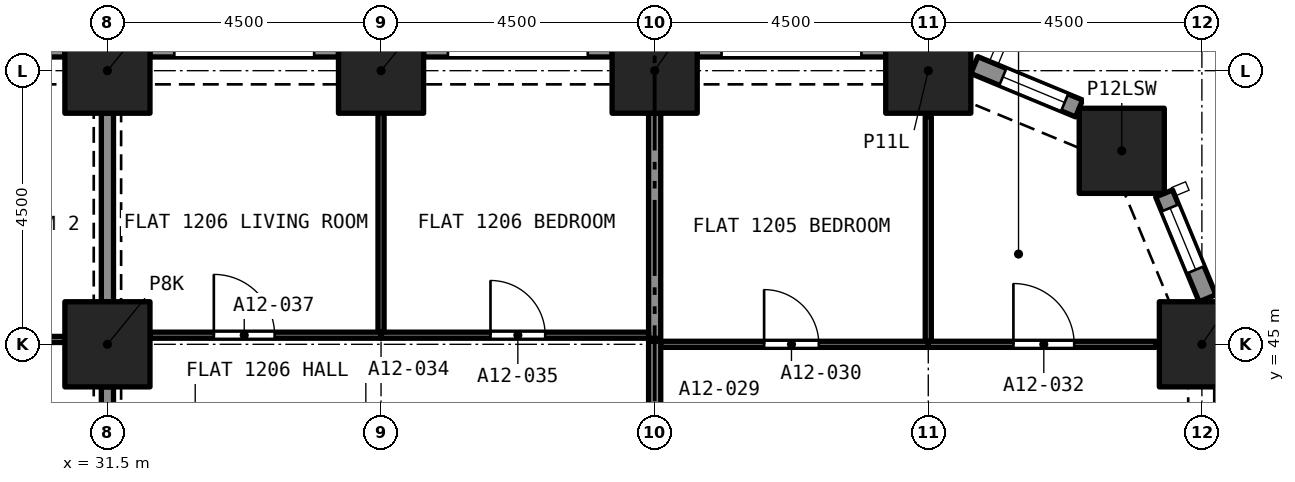
"""IFC4 building model, lengths in metres.
Left out: names, types, materials, properties, quantities, classifications, styles, units other than length and angle.
Written with IfcOpenShell. Run it as: python <this file> out.ifc"""

import sys

from ifc_helpers import new_model, si_unit, direction, frame, frame_2d, origin, origin_2d, place, context, subcontext, project, spatial, rectangle, extrude, element, fill, save


model = new_model("IFC4")
c1 = context("Model", 3, precision=1e-05, world=origin(), true_north=direction((0.0, 1.0)))
c2 = subcontext(c1, "Body", "Model", "MODEL_VIEW")
j1 = project(units=[si_unit("LENGTHUNIT", "METRE"), si_unit("PLANEANGLEUNIT", "RADIAN")], contexts=[c1])
p1 = place(None, origin())
s1 = spatial("IfcSite", under=j1, at=p1, CompositionType="ELEMENT")
p2 = place(p1, origin())
s2 = spatial("IfcBuilding", under=s1, at=p2, CompositionType="ELEMENT")
p3 = place(p2, frame((0.0, 0.0, 49.6)))
s3 = spatial("IfcBuildingStorey", under=s2, at=p3, CompositionType="ELEMENT", Elevation=49.6)
for number, where, z_axis, x_axis in (
    (1, (31.5, 45.0, 0.0), (0.0, 0.0, 1.0), (1.0, 0.0, 0.0)),
    (2, (49.5, 45.0, 0.0), (0.0, 0.0, 1.0), (1.0, 0.0, 0.0)),
    (3, (48.182, 48.182, 0.0), (0.0, 0.0, 1.0), (1.0, 0.0, 0.0)),
    (4, (31.5, 49.5, 0.0), (0.0, 0.0, 1.0), (1.0, 0.0, 0.0)),
    (5, (36.0, 49.5, 0.0), (0.0, 0.0, 1.0), (1.0, 0.0, 0.0)),
    (6, (40.5, 49.5, 0.0), (0.0, 0.0, 1.0), (1.0, 0.0, 0.0)),
    (7, (45.0, 49.5, 0.0), (0.0, 0.0, 1.0), (1.0, 0.0, 0.0)),
):
    element("IfcColumn", number, at=place(p3, frame(where, z_axis=z_axis, x_axis=x_axis)), inside=s3, PredefinedType="COLUMN", context=c2, shape_type="SweptSolid", body=[
        extrude(rectangle(XDim=1.4, YDim=1.4, at=origin_2d()), origin(), (0.0, 0.0, 1.0), 3.2),
    ])
p4 = place(p3, frame((48.878, 47.48, 0.0), z_axis=(0.0, 0.0, 1.0), x_axis=(0.38262540684, -0.923903565336, 0.0)))
e8 = element("IfcWall", 8, at=p4, inside=s3, PredefinedType="SOLIDWALL", context=c2, shape_type="SweptSolid", body=[
    extrude(rectangle(XDim=1.865, YDim=0.3, at=frame_2d((0.933, 0.0))), origin(), (0.0, 0.0, 1.0), 3.2),
])
p5 = place(p4, frame((0.258, 0.0, 0.45)))
e9 = element("IfcOpeningElement", 9, at=p5, cuts=e8, PredefinedType="OPENING", context=c2, shape_type="SweptSolid", body=[
    extrude(rectangle(XDim=1.1, YDim=1.95, at=frame_2d((0.55, 0.975))), frame((0.0, 0.16, 0.0), z_axis=(0.0, -1.0, 0.0), x_axis=(1.0, 0.0, 0.0)), (0.0, 0.0, 1.0), 0.32),
])
p6 = place(p3, frame((45.757, 49.592, 0.0), z_axis=(0.0, 0.0, 1.0), x_axis=(0.923857286003, -0.382737135771, 0.0)))
e10 = element("IfcWall", 10, at=p6, inside=s3, PredefinedType="SOLIDWALL", context=c2, shape_type="SweptSolid", body=[
    extrude(rectangle(XDim=1.865, YDim=0.3, at=frame_2d((0.933, 0.0))), origin(), (0.0, 0.0, 1.0), 3.2),
])
p7 = place(p6, frame((0.508, 0.0, 0.45)))
e11 = element("IfcOpeningElement", 11, at=p7, cuts=e10, PredefinedType="OPENING", context=c2, shape_type="SweptSolid", body=[
    extrude(rectangle(XDim=1.1, YDim=1.95, at=frame_2d((0.55, 0.975))), frame((0.0, 0.16, 0.0), z_axis=(0.0, -1.0, 0.0), x_axis=(1.0, 0.0, 0.0)), (0.0, 0.0, 1.0), 0.32),
])
p8 = place(p3, frame((41.2, 49.875, 0.0), z_axis=(0.0, 0.0, 1.0), x_axis=(1.0, 0.0, 0.0)))
e12 = element("IfcWall", 12, at=p8, inside=s3, PredefinedType="SOLIDWALL", context=c2, shape_type="SweptSolid", body=[
    extrude(rectangle(XDim=3.1, YDim=0.3, at=frame_2d((1.55, 0.0))), origin(), (0.0, 0.0, 1.0), 3.2),
])
p9 = place(p8, frame((0.4, 0.0, 0.45)))
e13 = element("IfcOpeningElement", 13, at=p9, cuts=e12, PredefinedType="OPENING", context=c2, shape_type="SweptSolid", body=[
    extrude(rectangle(XDim=2.3, YDim=1.95, at=frame_2d((1.15, 0.975))), frame((0.0, 0.16, 0.0), z_axis=(0.0, -1.0, 0.0), x_axis=(1.0, 0.0, 0.0)), (0.0, 0.0, 1.0), 0.32),
])
p10 = place(p3, frame((36.7, 49.875, 0.0), z_axis=(0.0, 0.0, 1.0), x_axis=(1.0, 0.0, 0.0)))
e14 = element("IfcWall", 14, at=p10, inside=s3, PredefinedType="SOLIDWALL", context=c2, shape_type="SweptSolid", body=[
    extrude(rectangle(XDim=3.1, YDim=0.3, at=frame_2d((1.55, 0.0))), origin(), (0.0, 0.0, 1.0), 3.2),
])
p11 = place(p10, frame((0.4, 0.0, 0.45)))
e15 = element("IfcOpeningElement", 15, at=p11, cuts=e14, PredefinedType="OPENING", context=c2, shape_type="SweptSolid", body=[
    extrude(rectangle(XDim=2.3, YDim=1.95, at=frame_2d((1.15, 0.975))), frame((0.0, 0.16, 0.0), z_axis=(0.0, -1.0, 0.0), x_axis=(1.0, 0.0, 0.0)), (0.0, 0.0, 1.0), 0.32),
])
p12 = place(p3, frame((32.2, 49.875, 0.0), z_axis=(0.0, 0.0, 1.0), x_axis=(1.0, 0.0, 0.0)))
e16 = element("IfcWall", 16, at=p12, inside=s3, PredefinedType="SOLIDWALL", context=c2, shape_type="SweptSolid", body=[
    extrude(rectangle(XDim=3.1, YDim=0.3, at=frame_2d((1.55, 0.0))), origin(), (0.0, 0.0, 1.0), 3.2),
])
p13 = place(p12, frame((0.4, 0.0, 0.45)))
e17 = element("IfcOpeningElement", 17, at=p13, cuts=e16, PredefinedType="OPENING", context=c2, shape_type="SweptSolid", body=[
    extrude(rectangle(XDim=2.3, YDim=1.95, at=frame_2d((1.15, 0.975))), frame((0.0, 0.16, 0.0), z_axis=(0.0, -1.0, 0.0), x_axis=(1.0, 0.0, 0.0)), (0.0, 0.0, 1.0), 0.32),
])
p14 = place(p3, frame((27.7, 49.875, 0.0), z_axis=(0.0, 0.0, 1.0), x_axis=(1.0, 0.0, 0.0)))
e18 = element("IfcWall", 18, at=p14, inside=s3, PredefinedType="SOLIDWALL", context=c2, shape_type="SweptSolid", body=[
    extrude(rectangle(XDim=3.1, YDim=0.3, at=frame_2d((1.55, 0.0))), origin(), (0.0, 0.0, 1.0), 3.2),
])
p15 = place(p14, frame((0.4, 0.0, 0.45)))
e19 = element("IfcOpeningElement", 19, at=p15, cuts=e18, PredefinedType="OPENING", context=c2, shape_type="SweptSolid", body=[
    extrude(rectangle(XDim=2.3, YDim=1.95, at=frame_2d((1.15, 0.975))), frame((0.0, 0.16, 0.0), z_axis=(0.0, -1.0, 0.0), x_axis=(1.0, 0.0, 0.0)), (0.0, 0.0, 1.0), 0.32),
])
p16 = place(p3, frame((40.6, 45.0, 0.0), z_axis=(0.0, 0.0, 1.0), x_axis=(1.0, 0.0, 0.0)))
e20 = element("IfcWall", 20, at=p16, inside=s3, PredefinedType="PARTITIONING", context=c2, shape_type="SweptSolid", body=[
    extrude(rectangle(XDim=4.4, YDim=0.1, at=frame_2d((2.2, 0.0))), origin(), (0.0, 0.0, 1.0), 2.9),
])
p17 = place(p16, frame((1.7, 0.0, 0.0)))
e21 = element("IfcOpeningElement", 21, at=p17, cuts=e20, PredefinedType="OPENING", context=c2, shape_type="SweptSolid", body=[
    extrude(rectangle(XDim=0.9, YDim=2.1, at=frame_2d((0.45, 1.05))), frame((0.0, 0.06, 0.0), z_axis=(0.0, -1.0, 0.0), x_axis=(1.0, 0.0, 0.0)), (0.0, 0.0, 1.0), 0.12),
])
p18 = place(p3, frame((45.0, 45.05, 0.0), z_axis=(0.0, 0.0, 1.0), x_axis=(0.0, 1.0, 0.0)))
e22 = element("IfcWall", 22, at=p18, inside=s3, PredefinedType="PARTITIONING", context=c2, shape_type="SweptSolid", body=[
    extrude(rectangle(XDim=3.692, YDim=0.1, at=frame_2d((1.846, 0.0))), origin(), (0.0, 0.0, 1.0), 2.9),
])
p19 = place(p3, frame((40.5, 45.1, 0.0), z_axis=(0.0, 0.0, 1.0), x_axis=(0.0, 1.0, 0.0)))
e23 = element("IfcWall", 23, at=p19, inside=s3, PredefinedType="PARTITIONING", context=c2, shape_type="SweptSolid", body=[
    extrude(rectangle(XDim=3.7, YDim=0.2, at=frame_2d((1.85, 0.0))), origin(), (0.0, 0.0, 1.0), 2.9),
])
p20 = place(p3, frame((45.0, 45.0, 0.0), z_axis=(0.0, 0.0, 1.0), x_axis=(1.0, 0.0, 0.0)))
e24 = element("IfcWall", 24, at=p20, inside=s3, PredefinedType="PARTITIONING", context=c2, shape_type="SweptSolid", body=[
    extrude(rectangle(XDim=3.742, YDim=0.1, at=frame_2d((1.871, 0.0))), origin(), (0.0, 0.0, 1.0), 2.9),
])
p21 = place(p20, frame((1.4, 0.0, 0.0)))
e25 = element("IfcOpeningElement", 25, at=p21, cuts=e24, PredefinedType="OPENING", context=c2, shape_type="SweptSolid", body=[
    extrude(rectangle(XDim=1.0, YDim=2.1, at=frame_2d((0.5, 1.05))), frame((0.0, 0.06, 0.0), z_axis=(0.0, -1.0, 0.0), x_axis=(1.0, 0.0, 0.0)), (0.0, 0.0, 1.0), 0.12),
])
p22 = place(p3, frame((40.5, 43.82, 0.0), z_axis=(0.0, 0.0, 1.0), x_axis=(0.0, 1.0, 0.0)))
e26 = element("IfcWall", 26, at=p22, inside=s3, PredefinedType="PARTITIONING", context=c2, shape_type="SweptSolid", body=[
    extrude(rectangle(XDim=1.23, YDim=0.2, at=frame_2d((0.615, 0.0))), origin(), (0.0, 0.0, 1.0), 2.9),
])
p23 = place(p3, frame((36.0, 45.15, 0.0), z_axis=(0.0, 0.0, 1.0), x_axis=(1.0, 0.0, 0.0)))
e27 = element("IfcWall", 27, at=p23, inside=s3, PredefinedType="PARTITIONING", context=c2, shape_type="SweptSolid", body=[
    extrude(rectangle(XDim=4.4, YDim=0.1, at=frame_2d((2.2, 0.0))), origin(), (0.0, 0.0, 1.0), 2.9),
])
p24 = place(p23, frame((1.8, 0.0, 0.0)))
e28 = element("IfcOpeningElement", 28, at=p24, cuts=e27, PredefinedType="OPENING", context=c2, shape_type="SweptSolid", body=[
    extrude(rectangle(XDim=0.9, YDim=2.1, at=frame_2d((0.45, 1.05))), frame((0.0, 0.06, 0.0), z_axis=(0.0, -1.0, 0.0), x_axis=(1.0, 0.0, 0.0)), (0.0, 0.0, 1.0), 0.12),
])
p25 = place(p3, frame((36.0, 45.2, 0.0), z_axis=(0.0, 0.0, 1.0), x_axis=(0.0, 1.0, 0.0)))
e29 = element("IfcWall", 29, at=p25, inside=s3, PredefinedType="PARTITIONING", context=c2, shape_type="SweptSolid", body=[
    extrude(rectangle(XDim=3.6, YDim=0.1, at=frame_2d((1.8, 0.0))), origin(), (0.0, 0.0, 1.0), 2.9),
])
p26 = place(p3, frame((32.2, 45.15, 0.0), z_axis=(0.0, 0.0, 1.0), x_axis=(1.0, 0.0, 0.0)))
e30 = element("IfcWall", 30, at=p26, inside=s3, PredefinedType="PARTITIONING", context=c2, shape_type="SweptSolid", body=[
    extrude(rectangle(XDim=3.8, YDim=0.1, at=frame_2d((1.9, 0.0))), origin(), (0.0, 0.0, 1.0), 2.9),
])
p27 = place(p26, frame((1.05, 0.0, 0.0)))
e31 = element("IfcOpeningElement", 31, at=p27, cuts=e30, PredefinedType="OPENING", context=c2, shape_type="SweptSolid", body=[
    extrude(rectangle(XDim=1.0, YDim=2.1, at=frame_2d((0.5, 1.05))), frame((0.0, 0.06, 0.0), z_axis=(0.0, -1.0, 0.0), x_axis=(1.0, 0.0, 0.0)), (0.0, 0.0, 1.0), 0.12),
])
for number, where, z_axis, x_axis in (
    (32, (31.5, 41.2, 0.0), (0.0, 0.0, 1.0), (0.0, 1.0, 0.0)),
    (33, (31.5, 45.7, 0.0), (0.0, 0.0, 1.0), (0.0, 1.0, 0.0)),
):
    element("IfcWall", number, at=place(p3, frame(where, z_axis=z_axis, x_axis=x_axis)), inside=s3, PredefinedType="PARTITIONING", context=c2, shape_type="SweptSolid", body=[
        extrude(rectangle(XDim=3.1, YDim=0.2, at=frame_2d((1.55, 0.0))), origin(), (0.0, 0.0, 1.0), 2.38),
    ])
p28 = place(p3, frame((27.0, 45.08, 0.0), z_axis=(0.0, 0.0, 1.0), x_axis=(1.0, 0.0, 0.0)))
e34 = element("IfcWall", 34, at=p28, inside=s3, PredefinedType="PARTITIONING", context=c2, shape_type="SweptSolid", body=[
    extrude(rectangle(XDim=3.8, YDim=0.1, at=frame_2d((1.9, 0.0))), origin(), (0.0, 0.0, 1.0), 2.75),
])
p29 = place(p28, frame((1.8, 0.0, 0.0)))
e35 = element("IfcOpeningElement", 35, at=p29, cuts=e34, PredefinedType="OPENING", context=c2, shape_type="SweptSolid", body=[
    extrude(rectangle(XDim=0.9, YDim=2.1, at=frame_2d((0.45, 1.05))), frame((0.0, 0.06, 0.0), z_axis=(0.0, -1.0, 0.0), x_axis=(1.0, 0.0, 0.0)), (0.0, 0.0, 1.0), 0.12),
])
p30 = place(p5, origin())
e36 = element("IfcWindow", 36, at=p30, inside=s3, PartitioningType="SINGLE_PANEL", PredefinedType="WINDOW", context=c2, shape_type="SweptSolid", body=[
    extrude(rectangle(XDim=1.1, YDim=1.95, at=frame_2d((0.55, 0.975))), frame((0.0, 0.03, 0.0), z_axis=(0.0, -1.0, 0.0), x_axis=(1.0, 0.0, 0.0)), (0.0, 0.0, 1.0), 0.06),
])
fill(e9, e36)
p31 = place(p7, origin())
e37 = element("IfcWindow", 37, at=p31, inside=s3, PartitioningType="SINGLE_PANEL", PredefinedType="WINDOW", context=c2, shape_type="SweptSolid", body=[
    extrude(rectangle(XDim=1.1, YDim=1.95, at=frame_2d((0.55, 0.975))), frame((0.0, 0.03, 0.0), z_axis=(0.0, -1.0, 0.0), x_axis=(1.0, 0.0, 0.0)), (0.0, 0.0, 1.0), 0.06),
])
fill(e11, e37)
p32 = place(p17, origin())
e38 = element("IfcDoor", 38, at=p32, inside=s3, OperationType="SINGLE_SWING_LEFT", PredefinedType="DOOR", context=c2, shape_type="SweptSolid", body=[
    extrude(rectangle(XDim=0.9, YDim=2.1, at=frame_2d((0.45, 1.05))), frame((0.0, 0.025, 0.0), z_axis=(0.0, -1.0, 0.0), x_axis=(1.0, 0.0, 0.0)), (0.0, 0.0, 1.0), 0.05),
])
fill(e21, e38)
p33 = place(p21, origin())
e39 = element("IfcDoor", 39, at=p33, inside=s3, OperationType="SINGLE_SWING_RIGHT", PredefinedType="DOOR", context=c2, shape_type="SweptSolid", body=[
    extrude(rectangle(XDim=1.0, YDim=2.1, at=frame_2d((0.5, 1.05))), frame((0.0, 0.025, 0.0), z_axis=(0.0, -1.0, 0.0), x_axis=(1.0, 0.0, 0.0)), (0.0, 0.0, 1.0), 0.05),
])
fill(e25, e39)
p34 = place(p24, origin())
e40 = element("IfcDoor", 40, at=p34, inside=s3, OperationType="SINGLE_SWING_RIGHT", PredefinedType="DOOR", context=c2, shape_type="SweptSolid", body=[
    extrude(rectangle(XDim=0.9, YDim=2.1, at=frame_2d((0.45, 1.05))), frame((0.0, 0.025, 0.0), z_axis=(0.0, -1.0, 0.0), x_axis=(1.0, 0.0, 0.0)), (0.0, 0.0, 1.0), 0.05),
])
fill(e28, e40)
p35 = place(p27, origin())
e41 = element("IfcDoor", 41, at=p35, inside=s3, OperationType="SINGLE_SWING_LEFT", PredefinedType="DOOR", context=c2, shape_type="SweptSolid", body=[
    extrude(rectangle(XDim=1.0, YDim=2.1, at=frame_2d((0.5, 1.05))), frame((0.0, 0.025, 0.0), z_axis=(0.0, -1.0, 0.0), x_axis=(1.0, 0.0, 0.0)), (0.0, 0.0, 1.0), 0.05),
])
fill(e31, e41)
save(model, sys.argv[1])
